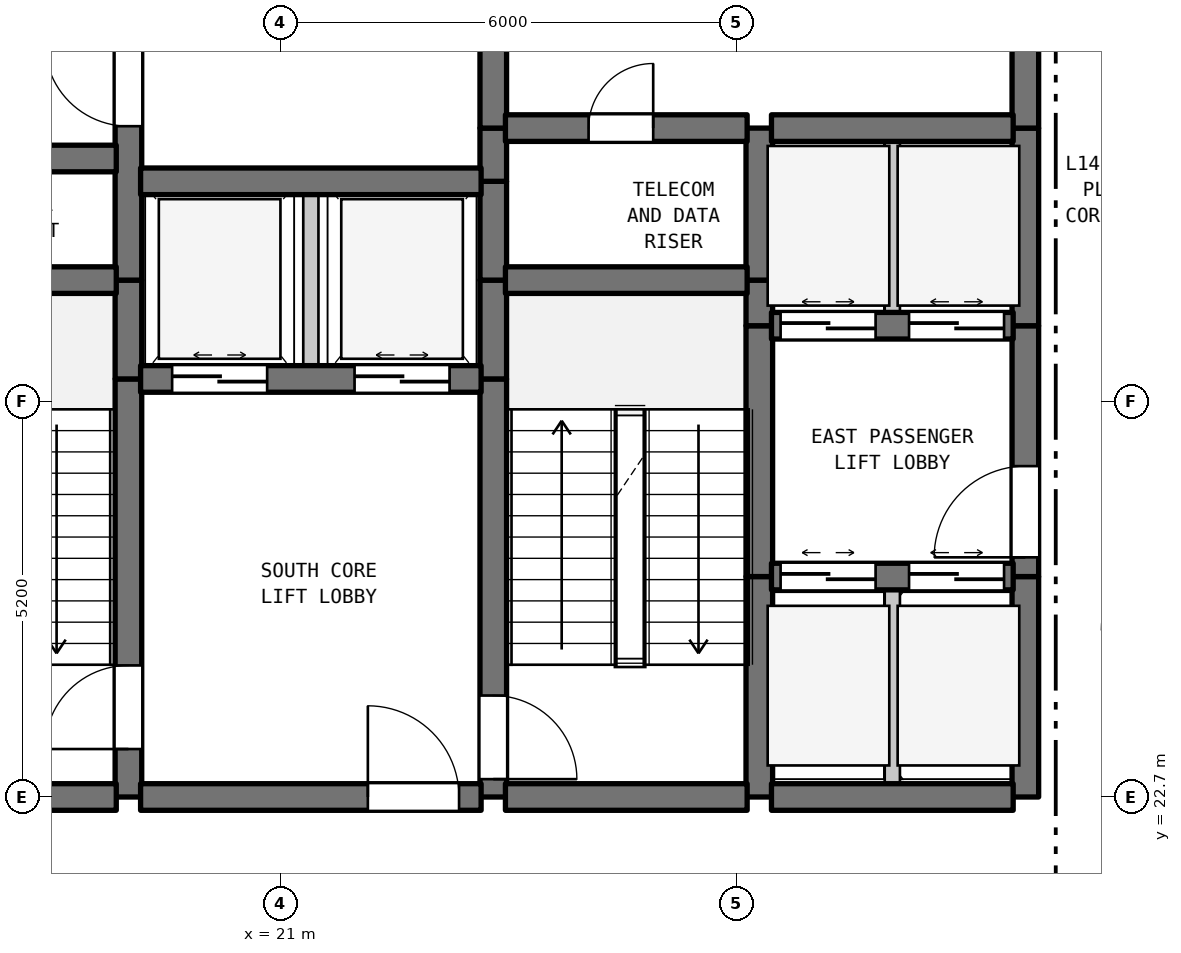
"""IFC4 building model, lengths in metres.
Left out: names, types, materials, properties, quantities, classifications, styles, units other than length and angle.
Written with IfcOpenShell. Run it as: python <this file> out.ifc"""

import sys

from ifc_helpers import new_model, si_unit, direction, frame, frame_2d, origin, place, context, subcontext, project, spatial, rectangle, extrude, element, fill, save


model = new_model("IFC4")
c1 = context("Model", 3, precision=1e-05, world=origin(), true_north=direction((0.0, 1.0)))
c2 = subcontext(c1, "Body", "Model", "MODEL_VIEW")
j1 = project(units=[si_unit("LENGTHUNIT", "METRE"), si_unit("PLANEANGLEUNIT", "RADIAN")], contexts=[c1])
p1 = place(None, origin())
s1 = spatial("IfcSite", under=j1, at=p1, CompositionType="ELEMENT")
p2 = place(p1, origin())
s2 = spatial("IfcBuilding", under=s1, at=p2, CompositionType="ELEMENT")
p3 = place(p2, frame((0.0, 0.0, 61.0)))
s3 = spatial("IfcBuildingStorey", under=s2, at=p3, CompositionType="ELEMENT", Elevation=61.0)
p4 = place(p3, frame((19.0, 22.7, 0.0), z_axis=(0.0, 0.0, 1.0), x_axis=(0.0, 1.0, 0.0)))
e1 = element("IfcWall", 1, at=p4, inside=s3, PredefinedType="SHEAR", context=c2, shape_type="SweptSolid", body=[
    extrude(rectangle(XDim=5.5, YDim=0.35, at=frame_2d((2.75, 0.0))), origin(), (0.0, 0.0, 1.0), 4.28),
])
p5 = place(p4, frame((0.631, 0.0, 0.0)))
e2 = element("IfcOpeningElement", 2, at=p5, cuts=e1, PredefinedType="OPENING", context=c2, shape_type="SweptSolid", body=[
    extrude(rectangle(XDim=1.1, YDim=2.15, at=frame_2d((0.55, 1.075))), frame((0.0, 0.185, 0.0), z_axis=(0.0, -1.0, 0.0), x_axis=(1.0, 0.0, 0.0)), (0.0, 0.0, 1.0), 0.37),
])
p6 = place(p3, frame((19.0, 28.2, 0.0), z_axis=(0.0, 0.0, 1.0), x_axis=(0.0, 1.0, 0.0)))
e3 = element("IfcWall", 3, at=p6, inside=s3, PredefinedType="SHEAR", context=c2, shape_type="SweptSolid", body=[
    extrude(rectangle(XDim=1.3, YDim=0.35, at=frame_2d((0.65, 0.0))), origin(), (0.0, 0.0, 1.0), 4.28),
])
p7 = place(p3, frame((19.0, 29.5, 0.0), z_axis=(0.0, 0.0, 1.0), x_axis=(0.0, 1.0, 0.0)))
e4 = element("IfcWall", 4, at=p7, inside=s3, PredefinedType="SHEAR", context=c2, shape_type="SweptSolid", body=[
    extrude(rectangle(XDim=5.5, YDim=0.35, at=frame_2d((2.75, 0.0))), origin(), (0.0, 0.0, 1.0), 4.28),
])
p8 = place(p7, frame((2.025, 0.0, 0.0)))
e5 = element("IfcOpeningElement", 5, at=p8, cuts=e4, PredefinedType="OPENING", context=c2, shape_type="SweptSolid", body=[
    extrude(rectangle(XDim=1.1, YDim=2.15, at=frame_2d((0.55, 1.075))), frame((0.0, 0.185, 0.0), z_axis=(0.0, -1.0, 0.0), x_axis=(1.0, 0.0, 0.0)), (0.0, 0.0, 1.0), 0.37),
])
p9 = place(p3, frame((21.4, 28.2, 0.0), z_axis=(0.0, 0.0, 1.0), x_axis=(0.0, 1.0, 0.0)))
e6 = element("IfcWall", 6, at=p9, inside=s3, PredefinedType="STANDARD", context=c2, shape_type="SweptSolid", body=[
    extrude(rectangle(XDim=2.6, YDim=0.2, at=frame_2d((1.3, 0.0))), origin(), (0.0, 0.0, 1.0), 4.28),
])
p10 = place(p3, frame((23.8, 22.7, 0.0), z_axis=(0.0, 0.0, 1.0), x_axis=(0.0, 1.0, 0.0)))
e7 = element("IfcWall", 7, at=p10, inside=s3, PredefinedType="SHEAR", context=c2, shape_type="SweptSolid", body=[
    extrude(rectangle(XDim=5.5, YDim=0.35, at=frame_2d((2.75, 0.0))), origin(), (0.0, 0.0, 1.0), 4.28),
])
p11 = place(p10, frame((0.235, 0.0, 0.0)))
e8 = element("IfcOpeningElement", 8, at=p11, cuts=e7, PredefinedType="OPENING", context=c2, shape_type="SweptSolid", body=[
    extrude(rectangle(XDim=1.1, YDim=2.15, at=frame_2d((0.55, 1.075))), frame((0.0, 0.185, 0.0), z_axis=(0.0, -1.0, 0.0), x_axis=(1.0, 0.0, 0.0)), (0.0, 0.0, 1.0), 0.37),
])
for number, where, z_axis, x_axis in (
    (9, (23.8, 28.2, 0.0), (0.0, 0.0, 1.0), (0.0, 1.0, 0.0)),
    (10, (23.8, 29.5, 0.0), (0.0, 0.0, 1.0), (0.0, 1.0, 0.0)),
):
    element("IfcWall", number, at=place(p3, frame(where, z_axis=z_axis, x_axis=x_axis)), inside=s3, PredefinedType="SHEAR", context=c2, shape_type="SweptSolid", body=[
        extrude(rectangle(XDim=1.3, YDim=0.35, at=frame_2d((0.65, 0.0))), origin(), (0.0, 0.0, 1.0), 4.28),
    ])
p12 = place(p3, frame((23.8, 30.8, 0.0), z_axis=(0.0, 0.0, 1.0), x_axis=(0.0, 1.0, 0.0)))
e11 = element("IfcWall", 11, at=p12, inside=s3, PredefinedType="SHEAR", context=c2, shape_type="SweptSolid", body=[
    extrude(rectangle(XDim=0.7, YDim=0.35, at=frame_2d((0.35, 0.0))), origin(), (0.0, 0.0, 1.0), 4.28),
])
p13 = place(p3, frame((23.8, 31.5, 0.0), z_axis=(0.0, 0.0, 1.0), x_axis=(0.0, 1.0, 0.0)))
e12 = element("IfcWall", 12, at=p13, inside=s3, PredefinedType="SHEAR", context=c2, shape_type="SweptSolid", body=[
    extrude(rectangle(XDim=3.5, YDim=0.35, at=frame_2d((1.75, 0.0))), origin(), (0.0, 0.0, 1.0), 4.28),
])
p14 = place(p13, frame((1.127, 0.0, 0.0)))
e13 = element("IfcOpeningElement", 13, at=p14, cuts=e12, PredefinedType="OPENING", context=c2, shape_type="SweptSolid", body=[
    extrude(rectangle(XDim=1.1, YDim=2.15, at=frame_2d((0.55, 1.075))), frame((0.0, 0.185, 0.0), z_axis=(0.0, -1.0, 0.0), x_axis=(1.0, 0.0, 0.0)), (0.0, 0.0, 1.0), 0.37),
])
p15 = place(p3, frame((27.3, 22.7, 0.0), z_axis=(0.0, 0.0, 1.0), x_axis=(0.0, 1.0, 0.0)))
e14 = element("IfcWall", 14, at=p15, inside=s3, PredefinedType="SHEAR", context=c2, shape_type="SweptSolid", body=[
    extrude(rectangle(XDim=2.9, YDim=0.35, at=frame_2d((1.45, 0.0))), origin(), (0.0, 0.0, 1.0), 4.28),
])
p16 = place(p3, frame((27.3, 25.6, 0.0), z_axis=(0.0, 0.0, 1.0), x_axis=(0.0, 1.0, 0.0)))
e15 = element("IfcWall", 15, at=p16, inside=s3, PredefinedType="SHEAR", context=c2, shape_type="SweptSolid", body=[
    extrude(rectangle(XDim=3.3, YDim=0.35, at=frame_2d((1.65, 0.0))), origin(), (0.0, 0.0, 1.0), 4.28),
])
p17 = place(p3, frame((27.3, 28.9, 0.0), z_axis=(0.0, 0.0, 1.0), x_axis=(0.0, 1.0, 0.0)))
e16 = element("IfcWall", 16, at=p17, inside=s3, PredefinedType="SHEAR", context=c2, shape_type="SweptSolid", body=[
    extrude(rectangle(XDim=0.6, YDim=0.35, at=frame_2d((0.3, 0.0))), origin(), (0.0, 0.0, 1.0), 4.28),
])
p18 = place(p3, frame((27.3, 29.5, 0.0), z_axis=(0.0, 0.0, 1.0), x_axis=(0.0, 1.0, 0.0)))
e17 = element("IfcWall", 17, at=p18, inside=s3, PredefinedType="SHEAR", context=c2, shape_type="SweptSolid", body=[
    extrude(rectangle(XDim=2.0, YDim=0.35, at=frame_2d((1.0, 0.0))), origin(), (0.0, 0.0, 1.0), 4.28),
])
p19 = place(p3, frame((29.05, 22.7, 0.0), z_axis=(0.0, 0.0, 1.0), x_axis=(0.0, 1.0, 0.0)))
e18 = element("IfcWall", 18, at=p19, inside=s3, PredefinedType="STANDARD", context=c2, shape_type="SweptSolid", body=[
    extrude(rectangle(XDim=2.9, YDim=0.2, at=frame_2d((1.45, 0.0))), origin(), (0.0, 0.0, 1.0), 4.28),
])
p20 = place(p3, frame((29.05, 28.9, 0.0), z_axis=(0.0, 0.0, 1.0), x_axis=(0.0, 1.0, 0.0)))
e19 = element("IfcWall", 19, at=p20, inside=s3, PredefinedType="STANDARD", context=c2, shape_type="SweptSolid", body=[
    extrude(rectangle(XDim=2.6, YDim=0.2, at=frame_2d((1.3, 0.0))), origin(), (0.0, 0.0, 1.0), 4.28),
])
p21 = place(p3, frame((30.8, 22.7, 0.0), z_axis=(0.0, 0.0, 1.0), x_axis=(0.0, 1.0, 0.0)))
e20 = element("IfcWall", 20, at=p21, inside=s3, PredefinedType="SHEAR", context=c2, shape_type="SweptSolid", body=[
    extrude(rectangle(XDim=2.9, YDim=0.35, at=frame_2d((1.45, 0.0))), origin(), (0.0, 0.0, 1.0), 4.28),
])
p22 = place(p3, frame((30.8, 25.6, 0.0), z_axis=(0.0, 0.0, 1.0), x_axis=(0.0, 1.0, 0.0)))
e21 = element("IfcWall", 21, at=p22, inside=s3, PredefinedType="SHEAR", context=c2, shape_type="SweptSolid", body=[
    extrude(rectangle(XDim=3.3, YDim=0.35, at=frame_2d((1.65, 0.0))), origin(), (0.0, 0.0, 1.0), 4.28),
])
p23 = place(p22, frame((0.253, 0.0, 0.0)))
e22 = element("IfcOpeningElement", 22, at=p23, cuts=e21, PredefinedType="OPENING", context=c2, shape_type="SweptSolid", body=[
    extrude(rectangle(XDim=1.2, YDim=2.2, at=frame_2d((0.6, 1.1))), frame((0.0, 0.185, 0.0), z_axis=(0.0, -1.0, 0.0), x_axis=(1.0, 0.0, 0.0)), (0.0, 0.0, 1.0), 0.37),
])
p24 = place(p3, frame((30.8, 28.9, 0.0), z_axis=(0.0, 0.0, 1.0), x_axis=(0.0, 1.0, 0.0)))
e23 = element("IfcWall", 23, at=p24, inside=s3, PredefinedType="SHEAR", context=c2, shape_type="SweptSolid", body=[
    extrude(rectangle(XDim=2.6, YDim=0.35, at=frame_2d((1.3, 0.0))), origin(), (0.0, 0.0, 1.0), 4.28),
])
p25 = place(p3, frame((30.8, 31.5, 0.0), z_axis=(0.0, 0.0, 1.0), x_axis=(0.0, 1.0, 0.0)))
e24 = element("IfcWall", 24, at=p25, inside=s3, PredefinedType="SHEAR", context=c2, shape_type="SweptSolid", body=[
    extrude(rectangle(XDim=3.5, YDim=0.35, at=frame_2d((1.75, 0.0))), origin(), (0.0, 0.0, 1.0), 4.28),
])
p26 = place(p25, frame((1.15, 0.0, 0.0)))
e25 = element("IfcOpeningElement", 25, at=p26, cuts=e24, PredefinedType="OPENING", context=c2, shape_type="SweptSolid", body=[
    extrude(rectangle(XDim=1.2, YDim=2.2, at=frame_2d((0.6, 1.1))), frame((0.0, 0.185, 0.0), z_axis=(0.0, -1.0, 0.0), x_axis=(1.0, 0.0, 0.0)), (0.0, 0.0, 1.0), 0.37),
])
p27 = place(p3, frame((15.16, 22.7, 0.0), z_axis=(0.0, 0.0, 1.0), x_axis=(1.0, 0.0, 0.0)))
e26 = element("IfcWall", 26, at=p27, inside=s3, PredefinedType="SHEAR", context=c2, shape_type="SweptSolid", body=[
    extrude(rectangle(XDim=3.68, YDim=0.35, at=frame_2d((1.84, 0.0))), origin(), (0.0, 0.0, 1.0), 4.28),
])
p28 = place(p3, frame((19.16, 22.7, 0.0), z_axis=(0.0, 0.0, 1.0), x_axis=(1.0, 0.0, 0.0)))
e27 = element("IfcWall", 27, at=p28, inside=s3, PredefinedType="SHEAR", context=c2, shape_type="SweptSolid", body=[
    extrude(rectangle(XDim=4.48, YDim=0.35, at=frame_2d((2.24, 0.0))), origin(), (0.0, 0.0, 1.0), 4.28),
])
p29 = place(p28, frame((2.99, 0.0, 0.0)))
e28 = element("IfcOpeningElement", 28, at=p29, cuts=e27, PredefinedType="OPENING", context=c2, shape_type="SweptSolid", body=[
    extrude(rectangle(XDim=1.2, YDim=2.2, at=frame_2d((0.6, 1.1))), frame((0.0, 0.185, 0.0), z_axis=(0.0, -1.0, 0.0), x_axis=(1.0, 0.0, 0.0)), (0.0, 0.0, 1.0), 0.37),
])
for number, where, z_axis, x_axis in (
    (29, (23.96, 22.7, 0.0), (0.0, 0.0, 1.0), (1.0, 0.0, 0.0)),
    (30, (27.46, 22.7, 0.0), (0.0, 0.0, 1.0), (1.0, 0.0, 0.0)),
):
    element("IfcWall", number, at=place(p3, frame(where, z_axis=z_axis, x_axis=x_axis)), inside=s3, PredefinedType="SHEAR", context=c2, shape_type="SweptSolid", body=[
        extrude(rectangle(XDim=3.18, YDim=0.35, at=frame_2d((1.59, 0.0))), origin(), (0.0, 0.0, 1.0), 4.28),
    ])
p30 = place(p3, frame((27.46, 25.6, 0.0), z_axis=(0.0, 0.0, 1.0), x_axis=(1.0, 0.0, 0.0)))
e31 = element("IfcWall", 31, at=p30, inside=s3, PredefinedType="SHEAR", context=c2, shape_type="SweptSolid", body=[
    extrude(rectangle(XDim=3.18, YDim=0.35, at=frame_2d((1.59, 0.0))), origin(), (0.0, 0.0, 1.0), 4.28),
])
p31 = place(p30, frame((0.12, 0.0, 0.0)))
e32 = element("IfcOpeningElement", 32, at=p31, cuts=e31, PredefinedType="OPENING", context=c2, shape_type="SweptSolid", body=[
    extrude(rectangle(XDim=1.25, YDim=2.2, at=frame_2d((0.625, 1.1))), frame((0.0, 0.185, 0.0), z_axis=(0.0, -1.0, 0.0), x_axis=(1.0, 0.0, 0.0)), (0.0, 0.0, 1.0), 0.37),
])
p32 = place(p30, frame((1.81, 0.0, 0.0)))
e33 = element("IfcOpeningElement", 33, at=p32, cuts=e31, PredefinedType="OPENING", context=c2, shape_type="SweptSolid", body=[
    extrude(rectangle(XDim=1.25, YDim=2.2, at=frame_2d((0.625, 1.1))), frame((0.0, 0.185, 0.0), z_axis=(0.0, -1.0, 0.0), x_axis=(1.0, 0.0, 0.0)), (0.0, 0.0, 1.0), 0.37),
])
p33 = place(p3, frame((19.16, 28.2, 0.0), z_axis=(0.0, 0.0, 1.0), x_axis=(1.0, 0.0, 0.0)))
e34 = element("IfcWall", 34, at=p33, inside=s3, PredefinedType="SHEAR", context=c2, shape_type="SweptSolid", body=[
    extrude(rectangle(XDim=4.48, YDim=0.35, at=frame_2d((2.24, 0.0))), origin(), (0.0, 0.0, 1.0), 4.28),
])
p34 = place(p33, frame((0.415, 0.0, 0.0)))
e35 = element("IfcOpeningElement", 35, at=p34, cuts=e34, PredefinedType="OPENING", context=c2, shape_type="SweptSolid", body=[
    extrude(rectangle(XDim=1.25, YDim=2.2, at=frame_2d((0.625, 1.1))), frame((0.0, 0.185, 0.0), z_axis=(0.0, -1.0, 0.0), x_axis=(1.0, 0.0, 0.0)), (0.0, 0.0, 1.0), 0.37),
])
p35 = place(p33, frame((2.815, 0.0, 0.0)))
e36 = element("IfcOpeningElement", 36, at=p35, cuts=e34, PredefinedType="OPENING", context=c2, shape_type="SweptSolid", body=[
    extrude(rectangle(XDim=1.25, YDim=2.2, at=frame_2d((0.625, 1.1))), frame((0.0, 0.185, 0.0), z_axis=(0.0, -1.0, 0.0), x_axis=(1.0, 0.0, 0.0)), (0.0, 0.0, 1.0), 0.37),
])
p36 = place(p3, frame((27.46, 28.9, 0.0), z_axis=(0.0, 0.0, 1.0), x_axis=(1.0, 0.0, 0.0)))
e37 = element("IfcWall", 37, at=p36, inside=s3, PredefinedType="SHEAR", context=c2, shape_type="SweptSolid", body=[
    extrude(rectangle(XDim=3.18, YDim=0.35, at=frame_2d((1.59, 0.0))), origin(), (0.0, 0.0, 1.0), 4.28),
])
p37 = place(p36, frame((0.12, 0.0, 0.0)))
e38 = element("IfcOpeningElement", 38, at=p37, cuts=e37, PredefinedType="OPENING", context=c2, shape_type="SweptSolid", body=[
    extrude(rectangle(XDim=1.25, YDim=2.2, at=frame_2d((0.625, 1.1))), frame((0.0, 0.185, 0.0), z_axis=(0.0, -1.0, 0.0), x_axis=(1.0, 0.0, 0.0)), (0.0, 0.0, 1.0), 0.37),
])
p38 = place(p36, frame((1.81, 0.0, 0.0)))
e39 = element("IfcOpeningElement", 39, at=p38, cuts=e37, PredefinedType="OPENING", context=c2, shape_type="SweptSolid", body=[
    extrude(rectangle(XDim=1.25, YDim=2.2, at=frame_2d((0.625, 1.1))), frame((0.0, 0.185, 0.0), z_axis=(0.0, -1.0, 0.0), x_axis=(1.0, 0.0, 0.0)), (0.0, 0.0, 1.0), 0.37),
])
p39 = place(p3, frame((15.16, 29.5, 0.0), z_axis=(0.0, 0.0, 1.0), x_axis=(1.0, 0.0, 0.0)))
e40 = element("IfcWall", 40, at=p39, inside=s3, PredefinedType="SHEAR", context=c2, shape_type="SweptSolid", body=[
    extrude(rectangle(XDim=3.68, YDim=0.35, at=frame_2d((1.84, 0.0))), origin(), (0.0, 0.0, 1.0), 4.28),
])
p40 = place(p3, frame((23.96, 29.5, 0.0), z_axis=(0.0, 0.0, 1.0), x_axis=(1.0, 0.0, 0.0)))
e41 = element("IfcWall", 41, at=p40, inside=s3, PredefinedType="SHEAR", context=c2, shape_type="SweptSolid", body=[
    extrude(rectangle(XDim=3.18, YDim=0.35, at=frame_2d((1.59, 0.0))), origin(), (0.0, 0.0, 1.0), 4.28),
])
p41 = place(p3, frame((19.16, 30.8, 0.0), z_axis=(0.0, 0.0, 1.0), x_axis=(1.0, 0.0, 0.0)))
e42 = element("IfcWall", 42, at=p41, inside=s3, PredefinedType="SHEAR", context=c2, shape_type="SweptSolid", body=[
    extrude(rectangle(XDim=4.48, YDim=0.35, at=frame_2d((2.24, 0.0))), origin(), (0.0, 0.0, 1.0), 4.28),
])
p42 = place(p3, frame((15.16, 31.1, 0.0), z_axis=(0.0, 0.0, 1.0), x_axis=(1.0, 0.0, 0.0)))
e43 = element("IfcWall", 43, at=p42, inside=s3, PredefinedType="SHEAR", context=c2, shape_type="SweptSolid", body=[
    extrude(rectangle(XDim=3.68, YDim=0.35, at=frame_2d((1.84, 0.0))), origin(), (0.0, 0.0, 1.0), 4.28),
])
p43 = place(p3, frame((23.96, 31.5, 0.0), z_axis=(0.0, 0.0, 1.0), x_axis=(1.0, 0.0, 0.0)))
e44 = element("IfcWall", 44, at=p43, inside=s3, PredefinedType="SHEAR", context=c2, shape_type="SweptSolid", body=[
    extrude(rectangle(XDim=3.18, YDim=0.35, at=frame_2d((1.59, 0.0))), origin(), (0.0, 0.0, 1.0), 4.28),
])
p44 = place(p43, frame((1.094, 0.0, 0.0)))
e45 = element("IfcOpeningElement", 45, at=p44, cuts=e44, PredefinedType="OPENING", context=c2, shape_type="SweptSolid", body=[
    extrude(rectangle(XDim=0.85, YDim=2.1, at=frame_2d((0.425, 1.05))), frame((0.0, 0.185, 0.0), z_axis=(0.0, -1.0, 0.0), x_axis=(1.0, 0.0, 0.0)), (0.0, 0.0, 1.0), 0.37),
])
p45 = place(p3, frame((27.46, 31.5, 0.0), z_axis=(0.0, 0.0, 1.0), x_axis=(1.0, 0.0, 0.0)))
e46 = element("IfcWall", 46, at=p45, inside=s3, PredefinedType="SHEAR", context=c2, shape_type="SweptSolid", body=[
    extrude(rectangle(XDim=3.18, YDim=0.35, at=frame_2d((1.59, 0.0))), origin(), (0.0, 0.0, 1.0), 4.28),
])
p46 = place(p5, origin())
e47 = element("IfcDoor", 47, at=p46, inside=s3, OperationType="SINGLE_SWING_LEFT", PredefinedType="DOOR", context=c2, shape_type="SweptSolid", body=[
    extrude(rectangle(XDim=1.1, YDim=2.15, at=frame_2d((0.55, 1.075))), frame((0.0, 0.025, 0.0), z_axis=(0.0, -1.0, 0.0), x_axis=(1.0, 0.0, 0.0)), (0.0, 0.0, 1.0), 0.05),
])
fill(e2, e47)
p47 = place(p8, origin())
e48 = element("IfcDoor", 48, at=p47, inside=s3, OperationType="SINGLE_SWING_RIGHT", PredefinedType="DOOR", context=c2, shape_type="SweptSolid", body=[
    extrude(rectangle(XDim=1.1, YDim=2.15, at=frame_2d((0.55, 1.075))), frame((0.0, 0.025, 0.0), z_axis=(0.0, -1.0, 0.0), x_axis=(1.0, 0.0, 0.0)), (0.0, 0.0, 1.0), 0.05),
])
fill(e5, e48)
p48 = place(p11, frame((1.1, 0.0, 0.0), z_axis=(0.0, 0.0, 1.0), x_axis=(-1.0, 0.0, 0.0)))
e49 = element("IfcDoor", 49, at=p48, inside=s3, OperationType="SINGLE_SWING_LEFT", PredefinedType="DOOR", context=c2, shape_type="SweptSolid", body=[
    extrude(rectangle(XDim=1.1, YDim=2.15, at=frame_2d((0.55, 1.075))), frame((0.0, 0.025, 0.0), z_axis=(0.0, -1.0, 0.0), x_axis=(1.0, 0.0, 0.0)), (0.0, 0.0, 1.0), 0.05),
])
fill(e8, e49)
p49 = place(p23, origin())
e50 = element("IfcDoor", 50, at=p49, inside=s3, OperationType="SINGLE_SWING_LEFT", PredefinedType="DOOR", context=c2, shape_type="SweptSolid", body=[
    extrude(rectangle(XDim=1.2, YDim=2.2, at=frame_2d((0.6, 1.1))), frame((0.0, 0.025, 0.0), z_axis=(0.0, -1.0, 0.0), x_axis=(1.0, 0.0, 0.0)), (0.0, 0.0, 1.0), 0.05),
])
fill(e22, e50)
p50 = place(p29, origin())
e51 = element("IfcDoor", 51, at=p50, inside=s3, OperationType="SINGLE_SWING_LEFT", PredefinedType="DOOR", context=c2, shape_type="SweptSolid", body=[
    extrude(rectangle(XDim=1.2, YDim=2.2, at=frame_2d((0.6, 1.1))), frame((0.0, 0.025, 0.0), z_axis=(0.0, -1.0, 0.0), x_axis=(1.0, 0.0, 0.0)), (0.0, 0.0, 1.0), 0.05),
])
fill(e28, e51)
p51 = place(p31, origin())
e52 = element("IfcDoor", 52, at=p51, inside=s3, OperationType="DOUBLE_DOOR_SLIDING", PredefinedType="DOOR", context=c2, shape_type="SweptSolid", body=[
    extrude(rectangle(XDim=1.25, YDim=2.2, at=frame_2d((0.625, 1.1))), frame((0.0, 0.025, 0.0), z_axis=(0.0, -1.0, 0.0), x_axis=(1.0, 0.0, 0.0)), (0.0, 0.0, 1.0), 0.05),
])
fill(e32, e52)
p52 = place(p32, origin())
e53 = element("IfcDoor", 53, at=p52, inside=s3, OperationType="DOUBLE_DOOR_SLIDING", PredefinedType="DOOR", context=c2, shape_type="SweptSolid", body=[
    extrude(rectangle(XDim=1.25, YDim=2.2, at=frame_2d((0.625, 1.1))), frame((0.0, 0.025, 0.0), z_axis=(0.0, -1.0, 0.0), x_axis=(1.0, 0.0, 0.0)), (0.0, 0.0, 1.0), 0.05),
])
fill(e33, e53)
p53 = place(p34, origin())
e54 = element("IfcDoor", 54, at=p53, inside=s3, OperationType="DOUBLE_DOOR_SLIDING", PredefinedType="DOOR", context=c2, shape_type="SweptSolid", body=[
    extrude(rectangle(XDim=1.25, YDim=2.2, at=frame_2d((0.625, 1.1))), frame((0.0, 0.025, 0.0), z_axis=(0.0, -1.0, 0.0), x_axis=(1.0, 0.0, 0.0)), (0.0, 0.0, 1.0), 0.05),
])
fill(e35, e54)
p54 = place(p35, origin())
e55 = element("IfcDoor", 55, at=p54, inside=s3, OperationType="DOUBLE_DOOR_SLIDING", PredefinedType="DOOR", context=c2, shape_type="SweptSolid", body=[
    extrude(rectangle(XDim=1.25, YDim=2.2, at=frame_2d((0.625, 1.1))), frame((0.0, 0.025, 0.0), z_axis=(0.0, -1.0, 0.0), x_axis=(1.0, 0.0, 0.0)), (0.0, 0.0, 1.0), 0.05),
])
fill(e36, e55)
p55 = place(p37, origin())
e56 = element("IfcDoor", 56, at=p55, inside=s3, OperationType="DOUBLE_DOOR_SLIDING", PredefinedType="DOOR", context=c2, shape_type="SweptSolid", body=[
    extrude(rectangle(XDim=1.25, YDim=2.2, at=frame_2d((0.625, 1.1))), frame((0.0, 0.025, 0.0), z_axis=(0.0, -1.0, 0.0), x_axis=(1.0, 0.0, 0.0)), (0.0, 0.0, 1.0), 0.05),
])
fill(e38, e56)
p56 = place(p38, origin())
e57 = element("IfcDoor", 57, at=p56, inside=s3, OperationType="DOUBLE_DOOR_SLIDING", PredefinedType="DOOR", context=c2, shape_type="SweptSolid", body=[
    extrude(rectangle(XDim=1.25, YDim=2.2, at=frame_2d((0.625, 1.1))), frame((0.0, 0.025, 0.0), z_axis=(0.0, -1.0, 0.0), x_axis=(1.0, 0.0, 0.0)), (0.0, 0.0, 1.0), 0.05),
])
fill(e39, e57)
p57 = place(p44, origin())
e58 = element("IfcDoor", 58, at=p57, inside=s3, OperationType="SINGLE_SWING_RIGHT", PredefinedType="DOOR", context=c2, shape_type="SweptSolid", body=[
    extrude(rectangle(XDim=0.85, YDim=2.1, at=frame_2d((0.425, 1.05))), frame((0.0, 0.025, 0.0), z_axis=(0.0, -1.0, 0.0), x_axis=(1.0, 0.0, 0.0)), (0.0, 0.0, 1.0), 0.05),
])
fill(e45, e58)
save(model, sys.argv[1])
